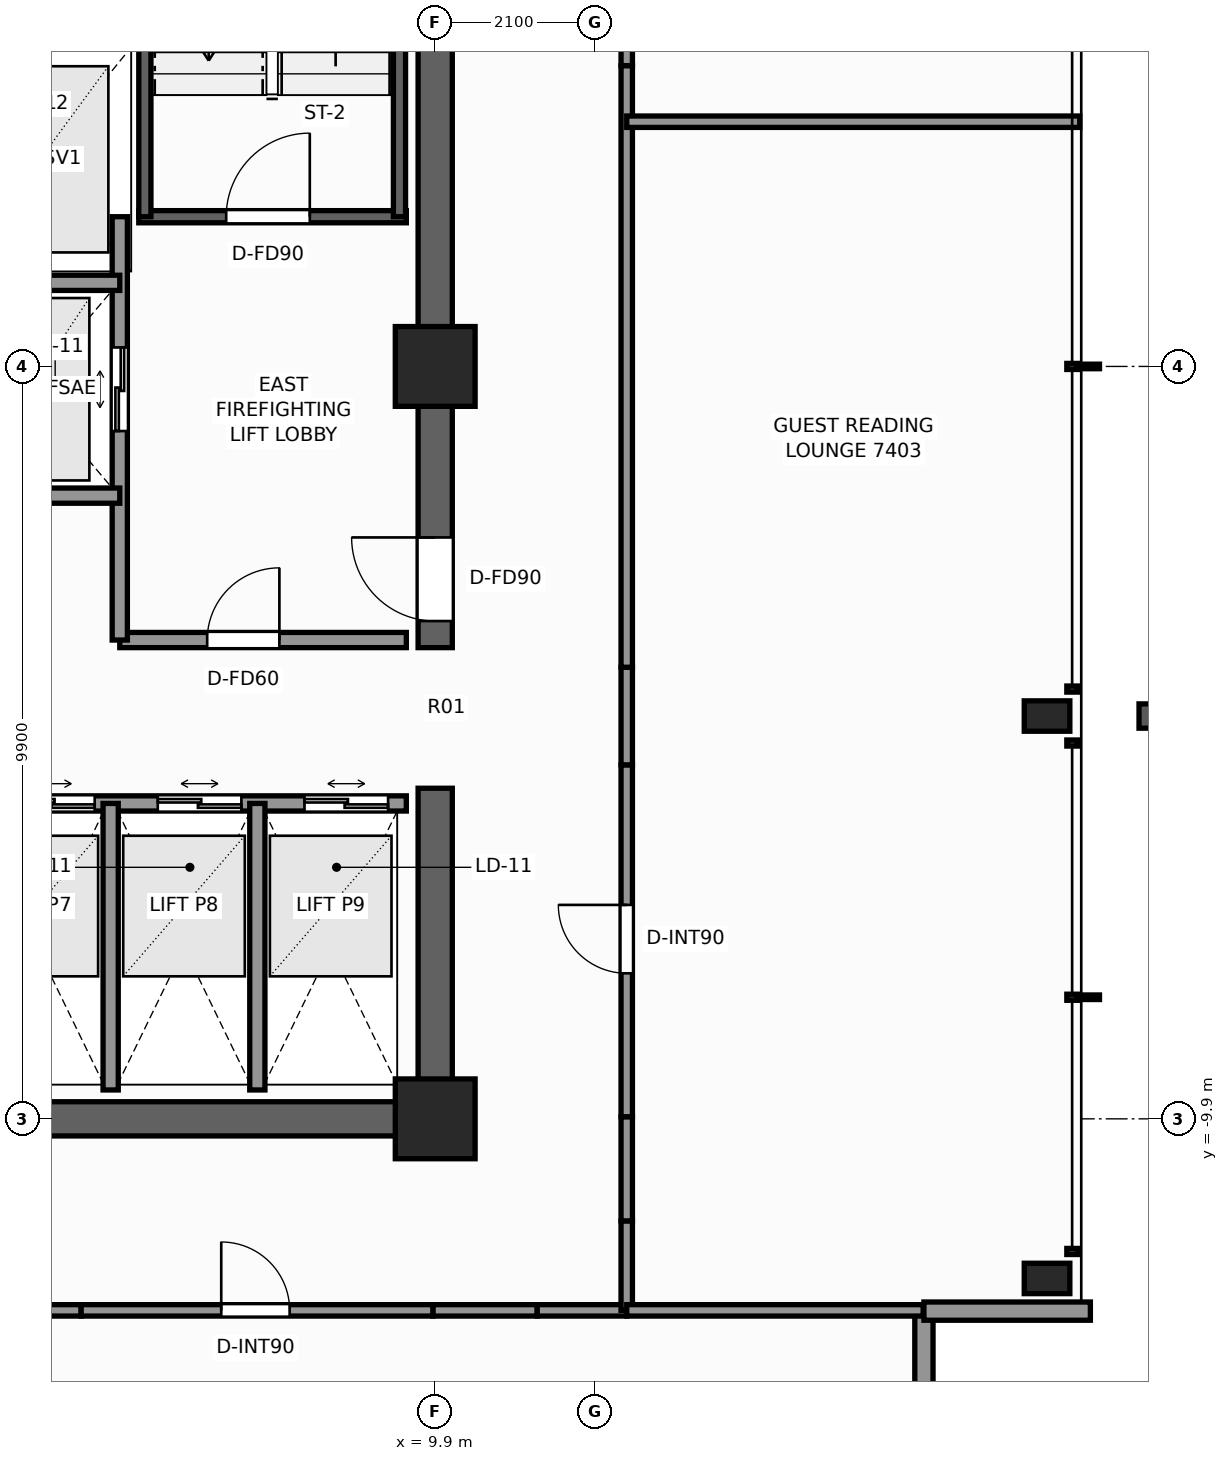
"""IFC4 building model, lengths in metres.
Left out: names, types, materials, properties, quantities, classifications, styles, units other than length and angle.
Written with IfcOpenShell. Run it as: python <this file> out.ifc"""

import sys

from ifc_helpers import new_model, si_unit, direction, frame, frame_2d, origin, origin_2d, place, context, subcontext, project, spatial, rectangle, extrude, element, fill, save


model = new_model("IFC4")
c1 = context("Model", 3, precision=1e-05, world=origin(), true_north=direction((0.0, 1.0)))
c2 = subcontext(c1, "Body", "Model", "MODEL_VIEW")
j1 = project(units=[si_unit("LENGTHUNIT", "METRE"), si_unit("PLANEANGLEUNIT", "RADIAN")], contexts=[c1])
p1 = place(None, origin())
s1 = spatial("IfcSite", under=j1, at=p1, CompositionType="ELEMENT")
p2 = place(p1, origin())
s2 = spatial("IfcBuilding", under=s1, at=p2, CompositionType="ELEMENT")
p3 = place(p2, frame((0.0, 0.0, 254.9)))
s3 = spatial("IfcBuildingStorey", under=s2, at=p3, CompositionType="ELEMENT", Elevation=254.9)
p4 = place(p3, frame((10.125, -9.9, 0.0), z_axis=(0.0, 0.0, 1.0), x_axis=(-1.0, 0.0, 0.0)))
e1 = element("IfcWall", 1, at=p4, inside=s3, PredefinedType="SHEAR", context=c2, shape_type="SweptSolid", body=[
    extrude(rectangle(XDim=11.985, YDim=0.45, at=frame_2d((5.993, 0.0))), origin(), (0.0, 0.0, 1.0), 3.5),
])
p5 = place(p3, frame((9.9, -9.675, 0.0), z_axis=(0.0, 0.0, 1.0), x_axis=(0.0, 1.0, 0.0)))
e2 = element("IfcWall", 2, at=p5, inside=s3, PredefinedType="SHEAR", context=c2, shape_type="SweptSolid", body=[
    extrude(rectangle(XDim=4.125, YDim=0.45, at=frame_2d((2.062, 0.0))), origin(), (0.0, 0.0, 1.0), 3.5),
])
p6 = place(p3, frame((9.9, -3.7, 0.0), z_axis=(0.0, 0.0, 1.0), x_axis=(0.0, 1.0, 0.0)))
e3 = element("IfcWall", 3, at=p6, inside=s3, PredefinedType="SHEAR", context=c2, shape_type="SweptSolid", body=[
    extrude(rectangle(XDim=13.375, YDim=0.45, at=frame_2d((6.688, 0.0))), origin(), (0.0, 0.0, 1.0), 3.5),
])
p7 = place(p6, frame((0.35, 0.0, 0.0)))
e4 = element("IfcOpeningElement", 4, at=p7, cuts=e3, PredefinedType="OPENING", context=c2, shape_type="SweptSolid", body=[
    extrude(rectangle(XDim=1.1, YDim=2.2, at=frame_2d((0.55, 1.1))), frame((0.0, 0.235, 0.0), z_axis=(0.0, -1.0, 0.0), x_axis=(1.0, 0.0, 0.0)), (0.0, 0.0, 1.0), 0.47),
])
for number, where, z_axis, x_axis in (
    (5, (9.9, -9.9, 0.0), (0.0, 0.0, 1.0), (1.0, 0.0, 0.0)),
    (6, (9.9, 0.0, 0.0), (0.0, 0.0, 1.0), (1.0, 0.0, 0.0)),
):
    element("IfcColumn", number, at=place(p3, frame(where, z_axis=z_axis, x_axis=x_axis)), inside=s3, PredefinedType="COLUMN", context=c2, shape_type="SweptSolid", body=[
        extrude(rectangle(XDim=1.05, YDim=1.05, at=origin_2d()), origin(), (0.0, 0.0, 1.0), 3.5),
    ])
for number, where, z_axis, x_axis in (
    (7, (17.95, -12.0, 0.0), (0.0, 0.0, 1.0), (1.0, 0.0, 0.0)),
    (8, (17.95, -4.6, 0.0), (0.0, 0.0, 1.0), (1.0, 0.0, 0.0)),
):
    element("IfcColumn", number, at=place(p3, frame(where, z_axis=z_axis, x_axis=x_axis)), inside=s3, PredefinedType="COLUMN", context=c2, shape_type="SweptSolid", body=[
        extrude(rectangle(XDim=0.6, YDim=0.4, at=origin_2d()), origin(), (0.0, 0.0, 1.0), 3.5),
    ])
p8 = place(p3, frame((16.33, -12.43, 0.0), z_axis=(0.0, 0.0, 1.0), x_axis=(0.0, -1.0, 0.0)))
e9 = element("IfcWall", 9, at=p8, inside=s3, PredefinedType="STANDARD", context=c2, shape_type="SweptSolid", body=[
    extrude(rectangle(XDim=2.19, YDim=0.24, at=frame_2d((1.095, 0.0))), origin(), (0.0, 0.0, 1.0), 2.603),
])
p9 = place(p3, frame((18.52, -12.43, 0.0), z_axis=(0.0, 0.0, 1.0), x_axis=(-1.0, 0.0, 0.0)))
e10 = element("IfcWall", 10, at=p9, inside=s3, PredefinedType="STANDARD", context=c2, shape_type="SweptSolid", body=[
    extrude(rectangle(XDim=2.19, YDim=0.24, at=frame_2d((1.095, 0.0))), origin(), (0.0, 0.0, 1.0), 1.415),
])
p10 = place(p3, frame((6.0, 1.97, 0.0), z_axis=(0.0, 0.0, 1.0), x_axis=(1.0, 0.0, 0.0)))
e11 = element("IfcWall", 11, at=p10, inside=s3, PredefinedType="SHEAR", context=c2, shape_type="SweptSolid", body=[
    extrude(rectangle(XDim=3.52, YDim=0.16, at=frame_2d((1.76, 0.0))), origin(), (0.0, 0.0, 1.0), 3.5),
])
p11 = place(p10, frame((1.15, 0.0, 0.0)))
e12 = element("IfcOpeningElement", 12, at=p11, cuts=e11, PredefinedType="OPENING", context=c2, shape_type="SweptSolid", body=[
    extrude(rectangle(XDim=1.1, YDim=2.2, at=frame_2d((0.55, 1.1))), frame((0.0, 0.09, 0.0), z_axis=(0.0, -1.0, 0.0), x_axis=(1.0, 0.0, 0.0)), (0.0, 0.0, 1.0), 0.18),
])
for number, where, z_axis, x_axis in (
    (13, (6.08, 1.97, 0.0), (0.0, 0.0, 1.0), (0.0, 1.0, 0.0)),
    (14, (9.43, 1.97, 0.0), (0.0, 0.0, 1.0), (0.0, 1.0, 0.0)),
):
    element("IfcWall", number, at=place(p3, frame(where, z_axis=z_axis, x_axis=x_axis)), inside=s3, PredefinedType="SHEAR", context=c2, shape_type="SweptSolid", body=[
        extrude(rectangle(XDim=7.56, YDim=0.16, at=frame_2d((3.78, 0.0))), origin(), (0.0, 0.0, 1.0), 3.5),
    ])
p12 = place(p3, frame((5.75, -3.6, 0.0), z_axis=(0.0, 0.0, 1.0), x_axis=(1.0, 0.0, 0.0)))
e15 = element("IfcWall", 15, at=p12, inside=s3, PredefinedType="SOLIDWALL", context=c2, shape_type="SweptSolid", body=[
    extrude(rectangle(XDim=3.77, YDim=0.2, at=frame_2d((1.885, 0.0))), origin(), (0.0, 0.0, 1.0), 3.22),
])
p13 = place(p12, frame((1.15, 0.0, 0.0)))
e16 = element("IfcOpeningElement", 16, at=p13, cuts=e15, PredefinedType="OPENING", context=c2, shape_type="SweptSolid", body=[
    extrude(rectangle(XDim=0.95, YDim=2.06, at=frame_2d((0.475, 1.03))), frame((0.0, 0.11, 0.0), z_axis=(0.0, -1.0, 0.0), x_axis=(1.0, 0.0, 0.0)), (0.0, 0.0, 1.0), 0.22),
])
p14 = place(p3, frame((5.75, -3.6, 0.0), z_axis=(0.0, 0.0, 1.0), x_axis=(0.0, 1.0, 0.0)))
e17 = element("IfcWall", 17, at=p14, inside=s3, PredefinedType="SOLIDWALL", context=c2, shape_type="SweptSolid", body=[
    extrude(rectangle(XDim=5.57, YDim=0.2, at=frame_2d((2.785, 0.0))), origin(), (0.0, 0.0, 1.0), 3.22),
])
p15 = place(p14, frame((2.75, 0.0, 0.0)))
e18 = element("IfcOpeningElement", 18, at=p15, cuts=e17, PredefinedType="OPENING", context=c2, shape_type="SweptSolid", body=[
    extrude(rectangle(XDim=1.1, YDim=2.2, at=frame_2d((0.55, 1.1))), frame((0.0, 0.11, 0.0), z_axis=(0.0, -1.0, 0.0), x_axis=(1.0, 0.0, 0.0)), (0.0, 0.0, 1.0), 0.22),
])
for number, where, z_axis, x_axis in (
    (19, (3.35, -1.7, 0.0), (0.0, 0.0, 1.0), (1.0, 0.0, 0.0)),
    (20, (3.35, 1.1, 0.0), (0.0, 0.0, 1.0), (1.0, 0.0, 0.0)),
):
    element("IfcWall", number, at=place(p3, frame(where, z_axis=z_axis, x_axis=x_axis)), inside=s3, PredefinedType="SOLIDWALL", context=c2, shape_type="SweptSolid", body=[
        extrude(rectangle(XDim=2.4, YDim=0.2, at=frame_2d((1.2, 0.0))), origin(), (0.0, 0.0, 1.0), 3.22),
    ])
p16 = place(p3, frame((3.86, -5.75, 0.0), z_axis=(0.0, 0.0, 1.0), x_axis=(1.0, 0.0, 0.0)))
e21 = element("IfcWall", 21, at=p16, inside=s3, PredefinedType="SOLIDWALL", context=c2, shape_type="SweptSolid", body=[
    extrude(rectangle(XDim=5.66, YDim=0.2, at=frame_2d((2.83, 0.0))), origin(), (0.0, 0.0, 1.0), 3.22),
])
p17 = place(p16, frame((0.46, 0.0, 0.0)))
e22 = element("IfcOpeningElement", 22, at=p17, cuts=e21, PredefinedType="OPENING", context=c2, shape_type="SweptSolid", body=[
    extrude(rectangle(XDim=1.1, YDim=2.2, at=frame_2d((0.55, 1.1))), frame((0.0, 0.11, 0.0), z_axis=(0.0, -1.0, 0.0), x_axis=(1.0, 0.0, 0.0)), (0.0, 0.0, 1.0), 0.22),
])
p18 = place(p16, frame((2.39, 0.0, 0.0)))
e23 = element("IfcOpeningElement", 23, at=p18, cuts=e21, PredefinedType="OPENING", context=c2, shape_type="SweptSolid", body=[
    extrude(rectangle(XDim=1.1, YDim=2.2, at=frame_2d((0.55, 1.1))), frame((0.0, 0.11, 0.0), z_axis=(0.0, -1.0, 0.0), x_axis=(1.0, 0.0, 0.0)), (0.0, 0.0, 1.0), 0.22),
])
p19 = place(p16, frame((4.32, 0.0, 0.0)))
e24 = element("IfcOpeningElement", 24, at=p19, cuts=e21, PredefinedType="OPENING", context=c2, shape_type="SweptSolid", body=[
    extrude(rectangle(XDim=1.1, YDim=2.2, at=frame_2d((0.55, 1.1))), frame((0.0, 0.11, 0.0), z_axis=(0.0, -1.0, 0.0), x_axis=(1.0, 0.0, 0.0)), (0.0, 0.0, 1.0), 0.22),
])
for number, where, z_axis, x_axis in (
    (25, (5.63, -9.52, 0.0), (0.0, 0.0, 1.0), (0.0, 1.0, 0.0)),
    (26, (7.56, -9.52, 0.0), (0.0, 0.0, 1.0), (0.0, 1.0, 0.0)),
):
    element("IfcWall", number, at=place(p3, frame(where, z_axis=z_axis, x_axis=x_axis)), inside=s3, PredefinedType="SOLIDWALL", context=c2, shape_type="SweptSolid", body=[
        extrude(rectangle(XDim=3.77, YDim=0.2, at=frame_2d((1.885, 0.0))), origin(), (0.0, 0.0, 1.0), 3.22),
    ])
p20 = place(p3, frame((3.958, -12.42, 0.0), z_axis=(0.0, 0.0, 1.0), x_axis=(1.0, 0.0, 0.0)))
e27 = element("IfcWall", 27, at=p20, inside=s3, PredefinedType="PARTITIONING", context=c2, shape_type="SweptSolid", body=[
    extrude(rectangle(XDim=1.284, YDim=0.15, at=frame_2d((0.642, 0.0))), origin(), (0.0, 0.0, 1.0), 1.405),
])
p21 = place(p3, frame((5.242, -12.42, 0.0), z_axis=(0.0, 0.0, 1.0), x_axis=(1.0, 0.0, 0.0)))
e28 = element("IfcWall", 28, at=p21, inside=s3, PredefinedType="PARTITIONING", context=c2, shape_type="SweptSolid", body=[
    extrude(rectangle(XDim=4.63, YDim=0.15, at=frame_2d((2.315, 0.0))), origin(), (0.0, 0.0, 1.0), 3.22),
])
p22 = place(p21, frame((1.843, 0.0, 0.0)))
e29 = element("IfcOpeningElement", 29, at=p22, cuts=e28, PredefinedType="OPENING", context=c2, shape_type="SweptSolid", body=[
    extrude(rectangle(XDim=0.9, YDim=2.06, at=frame_2d((0.45, 1.03))), frame((0.0, 0.085, 0.0), z_axis=(0.0, -1.0, 0.0), x_axis=(1.0, 0.0, 0.0)), (0.0, 0.0, 1.0), 0.17),
])
p23 = place(p3, frame((9.872, -12.42, 0.0), z_axis=(0.0, 0.0, 1.0), x_axis=(1.0, 0.0, 0.0)))
e30 = element("IfcWall", 30, at=p23, inside=s3, PredefinedType="PARTITIONING", context=c2, shape_type="SweptSolid", body=[
    extrude(rectangle(XDim=1.37, YDim=0.15, at=frame_2d((0.685, 0.0))), origin(), (0.0, 0.0, 1.0), 1.405),
])
for number, where, z_axis, x_axis in (
    (31, (11.242, -12.42, 0.0), (0.0, 0.0, 1.0), (1.0, 0.0, 0.0)),
    (32, (12.42, -12.42, 0.0), (0.0, 0.0, 1.0), (0.0, 1.0, 0.0)),
):
    element("IfcWall", number, at=place(p3, frame(where, z_axis=z_axis, x_axis=x_axis)), inside=s3, PredefinedType="PARTITIONING", context=c2, shape_type="SweptSolid", body=[
        extrude(rectangle(XDim=1.177, YDim=0.15, at=frame_2d((0.589, 0.0))), origin(), (0.0, 0.0, 1.0), 3.22),
    ])
p24 = place(p3, frame((12.42, -11.242, 0.0), z_axis=(0.0, 0.0, 1.0), x_axis=(0.0, 1.0, 0.0)))
e33 = element("IfcWall", 33, at=p24, inside=s3, PredefinedType="PARTITIONING", context=c2, shape_type="SweptSolid", body=[
    extrude(rectangle(XDim=1.37, YDim=0.15, at=frame_2d((0.685, 0.0))), origin(), (0.0, 0.0, 1.0), 1.405),
])
p25 = place(p3, frame((12.42, -9.872, 0.0), z_axis=(0.0, 0.0, 1.0), x_axis=(0.0, 1.0, 0.0)))
e34 = element("IfcWall", 34, at=p25, inside=s3, PredefinedType="PARTITIONING", context=c2, shape_type="SweptSolid", body=[
    extrude(rectangle(XDim=4.63, YDim=0.15, at=frame_2d((2.315, 0.0))), origin(), (0.0, 0.0, 1.0), 3.22),
])
p26 = place(p25, frame((1.887, 0.0, 0.0)))
e35 = element("IfcOpeningElement", 35, at=p26, cuts=e34, PredefinedType="OPENING", context=c2, shape_type="SweptSolid", body=[
    extrude(rectangle(XDim=0.9, YDim=2.06, at=frame_2d((0.45, 1.03))), frame((0.0, 0.085, 0.0), z_axis=(0.0, -1.0, 0.0), x_axis=(1.0, 0.0, 0.0)), (0.0, 0.0, 1.0), 0.17),
])
p27 = place(p3, frame((12.42, -5.242, 0.0), z_axis=(0.0, 0.0, 1.0), x_axis=(0.0, 1.0, 0.0)))
e36 = element("IfcWall", 36, at=p27, inside=s3, PredefinedType="PARTITIONING", context=c2, shape_type="SweptSolid", body=[
    extrude(rectangle(XDim=1.284, YDim=0.15, at=frame_2d((0.642, 0.0))), origin(), (0.0, 0.0, 1.0), 1.405),
])
p28 = place(p3, frame((12.42, -3.958, 0.0), z_axis=(0.0, 0.0, 1.0), x_axis=(0.0, 1.0, 0.0)))
e37 = element("IfcWall", 37, at=p28, inside=s3, PredefinedType="PARTITIONING", context=c2, shape_type="SweptSolid", body=[
    extrude(rectangle(XDim=7.916, YDim=0.15, at=frame_2d((3.958, 0.0))), origin(), (0.0, 0.0, 1.0), 2.745),
])
p29 = place(p3, frame((12.42, 3.958, 0.0), z_axis=(0.0, 0.0, 1.0), x_axis=(0.0, 1.0, 0.0)))
e38 = element("IfcWall", 38, at=p29, inside=s3, PredefinedType="PARTITIONING", context=c2, shape_type="SweptSolid", body=[
    extrude(rectangle(XDim=1.284, YDim=0.15, at=frame_2d((0.642, 0.0))), origin(), (0.0, 0.0, 1.0), 1.405),
])
p30 = place(p3, frame((12.42, -12.42, 0.0), z_axis=(0.0, 0.0, 1.0), x_axis=(1.0, 0.0, 0.0)))
e39 = element("IfcWall", 39, at=p30, inside=s3, PredefinedType="PARTITIONING", context=c2, shape_type="SweptSolid", body=[
    extrude(rectangle(XDim=3.9, YDim=0.15, at=frame_2d((1.95, 0.0))), origin(), (0.0, 0.0, 1.0), 3.22),
])
p31 = place(p3, frame((12.42, 3.22, 0.0), z_axis=(0.0, 0.0, 1.0), x_axis=(1.0, 0.0, 0.0)))
e40 = element("IfcWall", 40, at=p31, inside=s3, PredefinedType="PARTITIONING", context=c2, shape_type="SweptSolid", body=[
    extrude(rectangle(XDim=5.96, YDim=0.15, at=frame_2d((2.98, 0.0))), origin(), (0.0, 0.0, 1.0), 2.593),
])
p32 = place(p11, origin())
e41 = element("IfcDoor", 41, at=p32, inside=s3, OperationType="SINGLE_SWING_RIGHT", PredefinedType="DOOR", context=c2, shape_type="SweptSolid", body=[
    extrude(rectangle(XDim=1.1, YDim=2.2, at=frame_2d((0.55, 1.1))), frame((0.0, 0.025, 0.0), z_axis=(0.0, -1.0, 0.0), x_axis=(1.0, 0.0, 0.0)), (0.0, 0.0, 1.0), 0.05),
])
fill(e12, e41)
p33 = place(p7, origin())
e42 = element("IfcDoor", 42, at=p33, inside=s3, OperationType="SINGLE_SWING_RIGHT", PredefinedType="DOOR", context=c2, shape_type="SweptSolid", body=[
    extrude(rectangle(XDim=1.1, YDim=2.2, at=frame_2d((0.55, 1.1))), frame((0.0, 0.025, 0.0), z_axis=(0.0, -1.0, 0.0), x_axis=(1.0, 0.0, 0.0)), (0.0, 0.0, 1.0), 0.05),
])
fill(e4, e42)
p34 = place(p15, origin())
e43 = element("IfcDoor", 43, at=p34, inside=s3, OperationType="DOUBLE_DOOR_SLIDING", PredefinedType="DOOR", context=c2, shape_type="SweptSolid", body=[
    extrude(rectangle(XDim=1.1, YDim=2.2, at=frame_2d((0.55, 1.1))), frame((0.0, 0.025, 0.0), z_axis=(0.0, -1.0, 0.0), x_axis=(1.0, 0.0, 0.0)), (0.0, 0.0, 1.0), 0.05),
])
fill(e18, e43)
p35 = place(p17, origin())
e44 = element("IfcDoor", 44, at=p35, inside=s3, OperationType="DOUBLE_DOOR_SLIDING", PredefinedType="DOOR", context=c2, shape_type="SweptSolid", body=[
    extrude(rectangle(XDim=1.1, YDim=2.2, at=frame_2d((0.55, 1.1))), frame((0.0, 0.025, 0.0), z_axis=(0.0, -1.0, 0.0), x_axis=(1.0, 0.0, 0.0)), (0.0, 0.0, 1.0), 0.05),
])
fill(e22, e44)
p36 = place(p18, origin())
e45 = element("IfcDoor", 45, at=p36, inside=s3, OperationType="DOUBLE_DOOR_SLIDING", PredefinedType="DOOR", context=c2, shape_type="SweptSolid", body=[
    extrude(rectangle(XDim=1.1, YDim=2.2, at=frame_2d((0.55, 1.1))), frame((0.0, 0.025, 0.0), z_axis=(0.0, -1.0, 0.0), x_axis=(1.0, 0.0, 0.0)), (0.0, 0.0, 1.0), 0.05),
])
fill(e23, e45)
p37 = place(p19, origin())
e46 = element("IfcDoor", 46, at=p37, inside=s3, OperationType="DOUBLE_DOOR_SLIDING", PredefinedType="DOOR", context=c2, shape_type="SweptSolid", body=[
    extrude(rectangle(XDim=1.1, YDim=2.2, at=frame_2d((0.55, 1.1))), frame((0.0, 0.025, 0.0), z_axis=(0.0, -1.0, 0.0), x_axis=(1.0, 0.0, 0.0)), (0.0, 0.0, 1.0), 0.05),
])
fill(e24, e46)
p38 = place(p13, origin())
e47 = element("IfcDoor", 47, at=p38, inside=s3, OperationType="SINGLE_SWING_RIGHT", PredefinedType="DOOR", context=c2, shape_type="SweptSolid", body=[
    extrude(rectangle(XDim=0.95, YDim=2.06, at=frame_2d((0.475, 1.03))), frame((0.0, 0.025, 0.0), z_axis=(0.0, -1.0, 0.0), x_axis=(1.0, 0.0, 0.0)), (0.0, 0.0, 1.0), 0.05),
])
fill(e16, e47)
p39 = place(p22, origin())
e48 = element("IfcDoor", 48, at=p39, inside=s3, OperationType="SINGLE_SWING_LEFT", PredefinedType="DOOR", context=c2, shape_type="SweptSolid", body=[
    extrude(rectangle(XDim=0.9, YDim=2.06, at=frame_2d((0.45, 1.03))), frame((0.0, 0.025, 0.0), z_axis=(0.0, -1.0, 0.0), x_axis=(1.0, 0.0, 0.0)), (0.0, 0.0, 1.0), 0.05),
])
fill(e29, e48)
p40 = place(p26, origin())
e49 = element("IfcDoor", 49, at=p40, inside=s3, OperationType="SINGLE_SWING_RIGHT", PredefinedType="DOOR", context=c2, shape_type="SweptSolid", body=[
    extrude(rectangle(XDim=0.9, YDim=2.06, at=frame_2d((0.45, 1.03))), frame((0.0, 0.025, 0.0), z_axis=(0.0, -1.0, 0.0), x_axis=(1.0, 0.0, 0.0)), (0.0, 0.0, 1.0), 0.05),
])
fill(e35, e49)
save(model, sys.argv[1])
